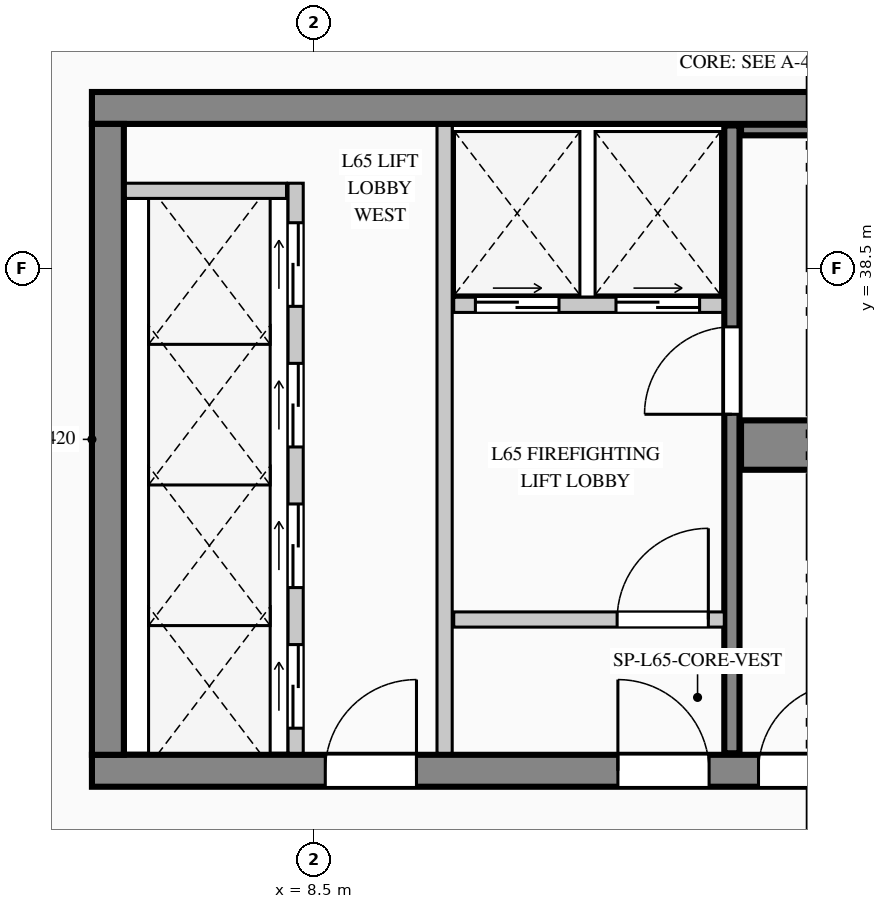
"""IFC4 building model, lengths in metres.
Left out: names, types, materials, properties, quantities, classifications, styles, units other than length and angle.
Written with IfcOpenShell. Run it as: python <this file> out.ifc"""

import sys

from ifc_helpers import new_model, si_unit, direction, frame, frame_2d, origin, place, context, subcontext, project, spatial, rectangle, extrude, element, fill, save


model = new_model("IFC4")
c1 = context("Model", 3, precision=1e-05, world=origin(), true_north=direction((0.0, 1.0)))
c2 = subcontext(c1, "Body", "Model", "MODEL_VIEW")
j1 = project(units=[si_unit("LENGTHUNIT", "METRE"), si_unit("PLANEANGLEUNIT", "RADIAN")], contexts=[c1])
p1 = place(None, origin())
s1 = spatial("IfcSite", under=j1, at=p1, CompositionType="ELEMENT")
p2 = place(p1, origin())
s2 = spatial("IfcBuilding", under=s1, at=p2, CompositionType="ELEMENT")
p3 = place(p2, frame((0.0, 0.0, 272.5)))
s3 = spatial("IfcBuildingStorey", under=s2, at=p3, CompositionType="ELEMENT", Elevation=272.5)
p4 = place(p3, frame((5.58, 40.61, 0.0), z_axis=(0.0, 0.0, 1.0), x_axis=(1.0, 0.0, 0.0)))
e1 = element("IfcWall", 1, at=p4, inside=s3, PredefinedType="SHEAR", context=c2, shape_type="SweptSolid", body=[
    extrude(rectangle(XDim=17.69, YDim=0.42, at=frame_2d((8.845, 0.0))), origin(), (0.0, 0.0, 1.0), 3.95),
])
p5 = place(p4, frame((15.865, 0.0, 0.0)))
e2 = element("IfcOpeningElement", 2, at=p5, cuts=e1, PredefinedType="OPENING", context=c2, shape_type="SweptSolid", body=[
    extrude(rectangle(XDim=1.18, YDim=2.25, at=frame_2d((0.59, 1.125))), frame((0.0, 0.22, 0.0), z_axis=(0.0, -1.0, 0.0), x_axis=(1.0, 0.0, 0.0)), (0.0, 0.0, 1.0), 0.44),
])
p6 = place(p3, frame((5.58, 31.89, 0.0), z_axis=(0.0, 0.0, 1.0), x_axis=(1.0, 0.0, 0.0)))
e3 = element("IfcWall", 3, at=p6, inside=s3, PredefinedType="SHEAR", context=c2, shape_type="SweptSolid", body=[
    extrude(rectangle(XDim=17.69, YDim=0.42, at=frame_2d((8.845, 0.0))), origin(), (0.0, 0.0, 1.0), 3.95),
])
p7 = place(p6, frame((3.07, 0.0, 0.0)))
e4 = element("IfcOpeningElement", 4, at=p7, cuts=e3, PredefinedType="OPENING", context=c2, shape_type="SweptSolid", body=[
    extrude(rectangle(XDim=1.2, YDim=2.2, at=frame_2d((0.6, 1.1))), frame((0.0, 0.22, 0.0), z_axis=(0.0, -1.0, 0.0), x_axis=(1.0, 0.0, 0.0)), (0.0, 0.0, 1.0), 0.44),
])
p8 = place(p6, frame((6.92, 0.0, 0.0)))
e5 = element("IfcOpeningElement", 5, at=p8, cuts=e3, PredefinedType="OPENING", context=c2, shape_type="SweptSolid", body=[
    extrude(rectangle(XDim=1.2, YDim=2.2, at=frame_2d((0.6, 1.1))), frame((0.0, 0.22, 0.0), z_axis=(0.0, -1.0, 0.0), x_axis=(1.0, 0.0, 0.0)), (0.0, 0.0, 1.0), 0.44),
])
p9 = place(p6, frame((8.77, 0.0, 0.0)))
e6 = element("IfcOpeningElement", 6, at=p9, cuts=e3, PredefinedType="OPENING", context=c2, shape_type="SweptSolid", body=[
    extrude(rectangle(XDim=1.15, YDim=2.2, at=frame_2d((0.575, 1.1))), frame((0.0, 0.22, 0.0), z_axis=(0.0, -1.0, 0.0), x_axis=(1.0, 0.0, 0.0)), (0.0, 0.0, 1.0), 0.44),
])
p10 = place(p6, frame((15.87, 0.0, 0.0)))
e7 = element("IfcOpeningElement", 7, at=p10, cuts=e3, PredefinedType="OPENING", context=c2, shape_type="SweptSolid", body=[
    extrude(rectangle(XDim=1.2, YDim=2.2, at=frame_2d((0.6, 1.1))), frame((0.0, 0.22, 0.0), z_axis=(0.0, -1.0, 0.0), x_axis=(1.0, 0.0, 0.0)), (0.0, 0.0, 1.0), 0.44),
])
p11 = place(p3, frame((5.79, 32.1, 0.0), z_axis=(0.0, 0.0, 1.0), x_axis=(0.0, 1.0, 0.0)))
e8 = element("IfcWall", 8, at=p11, inside=s3, PredefinedType="SHEAR", context=c2, shape_type="SweptSolid", body=[
    extrude(rectangle(XDim=8.3, YDim=0.42, at=frame_2d((4.15, 0.0))), origin(), (0.0, 0.0, 1.0), 3.95),
])
p12 = place(p3, frame((14.0, 32.12, 0.0), z_axis=(0.0, 0.0, 1.0), x_axis=(0.0, 1.0, 0.0)))
e9 = element("IfcWall", 9, at=p12, inside=s3, PredefinedType="SHEAR", context=c2, shape_type="SweptSolid", body=[
    extrude(rectangle(XDim=8.26, YDim=0.2, at=frame_2d((4.13, 0.0))), origin(), (0.0, 0.0, 1.0), 3.95),
])
p13 = place(p12, frame((4.46, 0.0, 0.0)))
e10 = element("IfcOpeningElement", 10, at=p13, cuts=e9, PredefinedType="OPENING", context=c2, shape_type="SweptSolid", body=[
    extrude(rectangle(XDim=1.15, YDim=2.2, at=frame_2d((0.575, 1.1))), frame((0.0, 0.11, 0.0), z_axis=(0.0, -1.0, 0.0), x_axis=(1.0, 0.0, 0.0)), (0.0, 0.0, 1.0), 0.22),
])
p14 = place(p3, frame((14.12, 36.175, 0.0), z_axis=(0.0, 0.0, 1.0), x_axis=(1.0, 0.0, 0.0)))
e11 = element("IfcWall", 11, at=p14, inside=s3, PredefinedType="SHEAR", context=c2, shape_type="SweptSolid", body=[
    extrude(rectangle(XDim=7.01, YDim=0.65, at=frame_2d((3.505, 0.0))), origin(), (0.0, 0.0, 1.0), 3.95),
])
p15 = place(p3, frame((14.12, 40.32, 0.0), z_axis=(0.0, 0.0, 1.0), x_axis=(1.0, 0.0, 0.0)))
e12 = element("IfcWall", 12, at=p15, inside=s3, PredefinedType="SHEAR", context=c2, shape_type="SweptSolid", body=[
    extrude(rectangle(XDim=7.01, YDim=0.14, at=frame_2d((3.505, 0.0))), origin(), (0.0, 0.0, 1.0), 3.95),
])
p16 = place(p3, frame((6.133, 4.42, 0.0), z_axis=(0.0, 0.0, 1.0), x_axis=(-0.089522678378, 0.995984784048, 0.0)))
e13 = element("IfcWall", 13, at=p16, inside=s3, PredefinedType="STANDARD", context=c2, shape_type="SweptSolid", body=[
    extrude(rectangle(XDim=37.31, YDim=0.24, at=frame_2d((18.655, 0.0))), origin(), (0.0, 0.0, 1.0), 3.7),
])
p17 = place(p16, frame((10.246, 0.0, 0.9)))
e14 = element("IfcOpeningElement", 14, at=p17, cuts=e13, PredefinedType="OPENING", context=c2, shape_type="SweptSolid", body=[
    extrude(rectangle(XDim=1.65, YDim=1.95, at=frame_2d((0.825, 0.975))), frame((0.0, 0.13, 0.0), z_axis=(0.0, -1.0, 0.0), x_axis=(1.0, 0.0, 0.0)), (0.0, 0.0, 1.0), 0.26),
])
p18 = place(p3, frame((8.26, 32.12, 0.0), z_axis=(0.0, 0.0, 1.0), x_axis=(0.0, 1.0, 0.0)))
e15 = element("IfcWall", 15, at=p18, inside=s3, PredefinedType="PARTITIONING", context=c2, shape_type="SweptSolid", body=[
    extrude(rectangle(XDim=7.5, YDim=0.2, at=frame_2d((3.75, 0.0))), origin(), (0.0, 0.0, 1.0), 3.7),
])
p19 = place(p18, frame((0.33, 0.0, 0.0)))
e16 = element("IfcOpeningElement", 16, at=p19, cuts=e15, PredefinedType="OPENING", context=c2, shape_type="SweptSolid", body=[
    extrude(rectangle(XDim=1.1, YDim=2.2, at=frame_2d((0.55, 1.1))), frame((0.0, 0.11, 0.0), z_axis=(0.0, -1.0, 0.0), x_axis=(1.0, 0.0, 0.0)), (0.0, 0.0, 1.0), 0.22),
])
p20 = place(p18, frame((2.18, 0.0, 0.0)))
e17 = element("IfcOpeningElement", 17, at=p20, cuts=e15, PredefinedType="OPENING", context=c2, shape_type="SweptSolid", body=[
    extrude(rectangle(XDim=1.1, YDim=2.2, at=frame_2d((0.55, 1.1))), frame((0.0, 0.11, 0.0), z_axis=(0.0, -1.0, 0.0), x_axis=(1.0, 0.0, 0.0)), (0.0, 0.0, 1.0), 0.22),
])
p21 = place(p18, frame((4.03, 0.0, 0.0)))
e18 = element("IfcOpeningElement", 18, at=p21, cuts=e15, PredefinedType="OPENING", context=c2, shape_type="SweptSolid", body=[
    extrude(rectangle(XDim=1.1, YDim=2.2, at=frame_2d((0.55, 1.1))), frame((0.0, 0.11, 0.0), z_axis=(0.0, -1.0, 0.0), x_axis=(1.0, 0.0, 0.0)), (0.0, 0.0, 1.0), 0.22),
])
p22 = place(p18, frame((5.88, 0.0, 0.0)))
e19 = element("IfcOpeningElement", 19, at=p22, cuts=e15, PredefinedType="OPENING", context=c2, shape_type="SweptSolid", body=[
    extrude(rectangle(XDim=1.1, YDim=2.2, at=frame_2d((0.55, 1.1))), frame((0.0, 0.11, 0.0), z_axis=(0.0, -1.0, 0.0), x_axis=(1.0, 0.0, 0.0)), (0.0, 0.0, 1.0), 0.22),
])
p23 = place(p3, frame((6.02, 39.52, 0.0), z_axis=(0.0, 0.0, 1.0), x_axis=(1.0, 0.0, 0.0)))
e20 = element("IfcWall", 20, at=p23, inside=s3, PredefinedType="PARTITIONING", context=c2, shape_type="SweptSolid", body=[
    extrude(rectangle(XDim=2.12, YDim=0.2, at=frame_2d((1.06, 0.0))), origin(), (0.0, 0.0, 1.0), 3.7),
])
p24 = place(p3, frame((10.22, 32.12, 0.0), z_axis=(0.0, 0.0, 1.0), x_axis=(0.0, 1.0, 0.0)))
e21 = element("IfcWall", 21, at=p24, inside=s3, PredefinedType="PARTITIONING", context=c2, shape_type="SweptSolid", body=[
    extrude(rectangle(XDim=8.26, YDim=0.2, at=frame_2d((4.13, 0.0))), origin(), (0.0, 0.0, 1.0), 3.7),
])
p25 = place(p3, frame((10.34, 38.02, 0.0), z_axis=(0.0, 0.0, 1.0), x_axis=(1.0, 0.0, 0.0)))
e22 = element("IfcWall", 22, at=p25, inside=s3, PredefinedType="PARTITIONING", context=c2, shape_type="SweptSolid", body=[
    extrude(rectangle(XDim=3.54, YDim=0.2, at=frame_2d((1.77, 0.0))), origin(), (0.0, 0.0, 1.0), 3.7),
])
p26 = place(p25, frame((0.285, 0.0, 0.0)))
e23 = element("IfcOpeningElement", 23, at=p26, cuts=e22, PredefinedType="OPENING", context=c2, shape_type="SweptSolid", body=[
    extrude(rectangle(XDim=1.1, YDim=2.2, at=frame_2d((0.55, 1.1))), frame((0.0, 0.11, 0.0), z_axis=(0.0, -1.0, 0.0), x_axis=(1.0, 0.0, 0.0)), (0.0, 0.0, 1.0), 0.22),
])
p27 = place(p25, frame((2.135, 0.0, 0.0)))
e24 = element("IfcOpeningElement", 24, at=p27, cuts=e22, PredefinedType="OPENING", context=c2, shape_type="SweptSolid", body=[
    extrude(rectangle(XDim=1.1, YDim=2.2, at=frame_2d((0.55, 1.1))), frame((0.0, 0.11, 0.0), z_axis=(0.0, -1.0, 0.0), x_axis=(1.0, 0.0, 0.0)), (0.0, 0.0, 1.0), 0.22),
])
p28 = place(p3, frame((10.34, 33.88, 0.0), z_axis=(0.0, 0.0, 1.0), x_axis=(1.0, 0.0, 0.0)))
e25 = element("IfcWall", 25, at=p28, inside=s3, PredefinedType="PARTITIONING", context=c2, shape_type="SweptSolid", body=[
    extrude(rectangle(XDim=3.56, YDim=0.2, at=frame_2d((1.78, 0.0))), origin(), (0.0, 0.0, 1.0), 3.7),
])
p29 = place(p28, frame((2.15, 0.0, 0.0)))
e26 = element("IfcOpeningElement", 26, at=p29, cuts=e25, PredefinedType="OPENING", context=c2, shape_type="SweptSolid", body=[
    extrude(rectangle(XDim=1.2, YDim=2.2, at=frame_2d((0.6, 1.1))), frame((0.0, 0.11, 0.0), z_axis=(0.0, -1.0, 0.0), x_axis=(1.0, 0.0, 0.0)), (0.0, 0.0, 1.0), 0.22),
])
p30 = place(p7, origin())
e27 = element("IfcDoor", 27, at=p30, inside=s3, OperationType="SINGLE_SWING_RIGHT", PredefinedType="DOOR", context=c2, shape_type="SweptSolid", body=[
    extrude(rectangle(XDim=1.2, YDim=2.2, at=frame_2d((0.6, 1.1))), frame((0.0, 0.025, 0.0), z_axis=(0.0, -1.0, 0.0), x_axis=(1.0, 0.0, 0.0)), (0.0, 0.0, 1.0), 0.05),
])
fill(e4, e27)
p31 = place(p8, origin())
e28 = element("IfcDoor", 28, at=p31, inside=s3, OperationType="SINGLE_SWING_LEFT", PredefinedType="DOOR", context=c2, shape_type="SweptSolid", body=[
    extrude(rectangle(XDim=1.2, YDim=2.2, at=frame_2d((0.6, 1.1))), frame((0.0, 0.025, 0.0), z_axis=(0.0, -1.0, 0.0), x_axis=(1.0, 0.0, 0.0)), (0.0, 0.0, 1.0), 0.05),
])
fill(e5, e28)
p32 = place(p9, origin())
e29 = element("IfcDoor", 29, at=p32, inside=s3, OperationType="SINGLE_SWING_RIGHT", PredefinedType="DOOR", context=c2, shape_type="SweptSolid", body=[
    extrude(rectangle(XDim=1.15, YDim=2.2, at=frame_2d((0.575, 1.1))), frame((0.0, 0.025, 0.0), z_axis=(0.0, -1.0, 0.0), x_axis=(1.0, 0.0, 0.0)), (0.0, 0.0, 1.0), 0.05),
])
fill(e6, e29)
p33 = place(p29, origin())
e30 = element("IfcDoor", 30, at=p33, inside=s3, OperationType="SINGLE_SWING_RIGHT", PredefinedType="DOOR", context=c2, shape_type="SweptSolid", body=[
    extrude(rectangle(XDim=1.2, YDim=2.2, at=frame_2d((0.6, 1.1))), frame((0.0, 0.025, 0.0), z_axis=(0.0, -1.0, 0.0), x_axis=(1.0, 0.0, 0.0)), (0.0, 0.0, 1.0), 0.05),
])
fill(e26, e30)
p34 = place(p13, origin())
e31 = element("IfcDoor", 31, at=p34, inside=s3, OperationType="SINGLE_SWING_LEFT", PredefinedType="DOOR", context=c2, shape_type="SweptSolid", body=[
    extrude(rectangle(XDim=1.15, YDim=2.2, at=frame_2d((0.575, 1.1))), frame((0.0, 0.025, 0.0), z_axis=(0.0, -1.0, 0.0), x_axis=(1.0, 0.0, 0.0)), (0.0, 0.0, 1.0), 0.05),
])
fill(e10, e31)
p35 = place(p19, origin())
e32 = element("IfcDoor", 32, at=p35, inside=s3, OperationType="DOUBLE_DOOR_SLIDING", PredefinedType="DOOR", context=c2, shape_type="SweptSolid", body=[
    extrude(rectangle(XDim=1.1, YDim=2.2, at=frame_2d((0.55, 1.1))), frame((0.0, 0.025, 0.0), z_axis=(0.0, -1.0, 0.0), x_axis=(1.0, 0.0, 0.0)), (0.0, 0.0, 1.0), 0.05),
])
fill(e16, e32)
p36 = place(p20, origin())
e33 = element("IfcDoor", 33, at=p36, inside=s3, OperationType="DOUBLE_DOOR_SLIDING", PredefinedType="DOOR", context=c2, shape_type="SweptSolid", body=[
    extrude(rectangle(XDim=1.1, YDim=2.2, at=frame_2d((0.55, 1.1))), frame((0.0, 0.025, 0.0), z_axis=(0.0, -1.0, 0.0), x_axis=(1.0, 0.0, 0.0)), (0.0, 0.0, 1.0), 0.05),
])
fill(e17, e33)
p37 = place(p21, origin())
e34 = element("IfcDoor", 34, at=p37, inside=s3, OperationType="DOUBLE_DOOR_SLIDING", PredefinedType="DOOR", context=c2, shape_type="SweptSolid", body=[
    extrude(rectangle(XDim=1.1, YDim=2.2, at=frame_2d((0.55, 1.1))), frame((0.0, 0.025, 0.0), z_axis=(0.0, -1.0, 0.0), x_axis=(1.0, 0.0, 0.0)), (0.0, 0.0, 1.0), 0.05),
])
fill(e18, e34)
p38 = place(p22, origin())
e35 = element("IfcDoor", 35, at=p38, inside=s3, OperationType="DOUBLE_DOOR_SLIDING", PredefinedType="DOOR", context=c2, shape_type="SweptSolid", body=[
    extrude(rectangle(XDim=1.1, YDim=2.2, at=frame_2d((0.55, 1.1))), frame((0.0, 0.025, 0.0), z_axis=(0.0, -1.0, 0.0), x_axis=(1.0, 0.0, 0.0)), (0.0, 0.0, 1.0), 0.05),
])
fill(e19, e35)
p39 = place(p26, origin())
e36 = element("IfcDoor", 36, at=p39, inside=s3, OperationType="DOUBLE_DOOR_SLIDING", PredefinedType="DOOR", context=c2, shape_type="SweptSolid", body=[
    extrude(rectangle(XDim=1.1, YDim=2.2, at=frame_2d((0.55, 1.1))), frame((0.0, 0.025, 0.0), z_axis=(0.0, -1.0, 0.0), x_axis=(1.0, 0.0, 0.0)), (0.0, 0.0, 1.0), 0.05),
])
fill(e23, e36)
p40 = place(p27, origin())
e37 = element("IfcDoor", 37, at=p40, inside=s3, OperationType="DOUBLE_DOOR_SLIDING", PredefinedType="DOOR", context=c2, shape_type="SweptSolid", body=[
    extrude(rectangle(XDim=1.1, YDim=2.2, at=frame_2d((0.55, 1.1))), frame((0.0, 0.025, 0.0), z_axis=(0.0, -1.0, 0.0), x_axis=(1.0, 0.0, 0.0)), (0.0, 0.0, 1.0), 0.05),
])
fill(e24, e37)
save(model, sys.argv[1])
